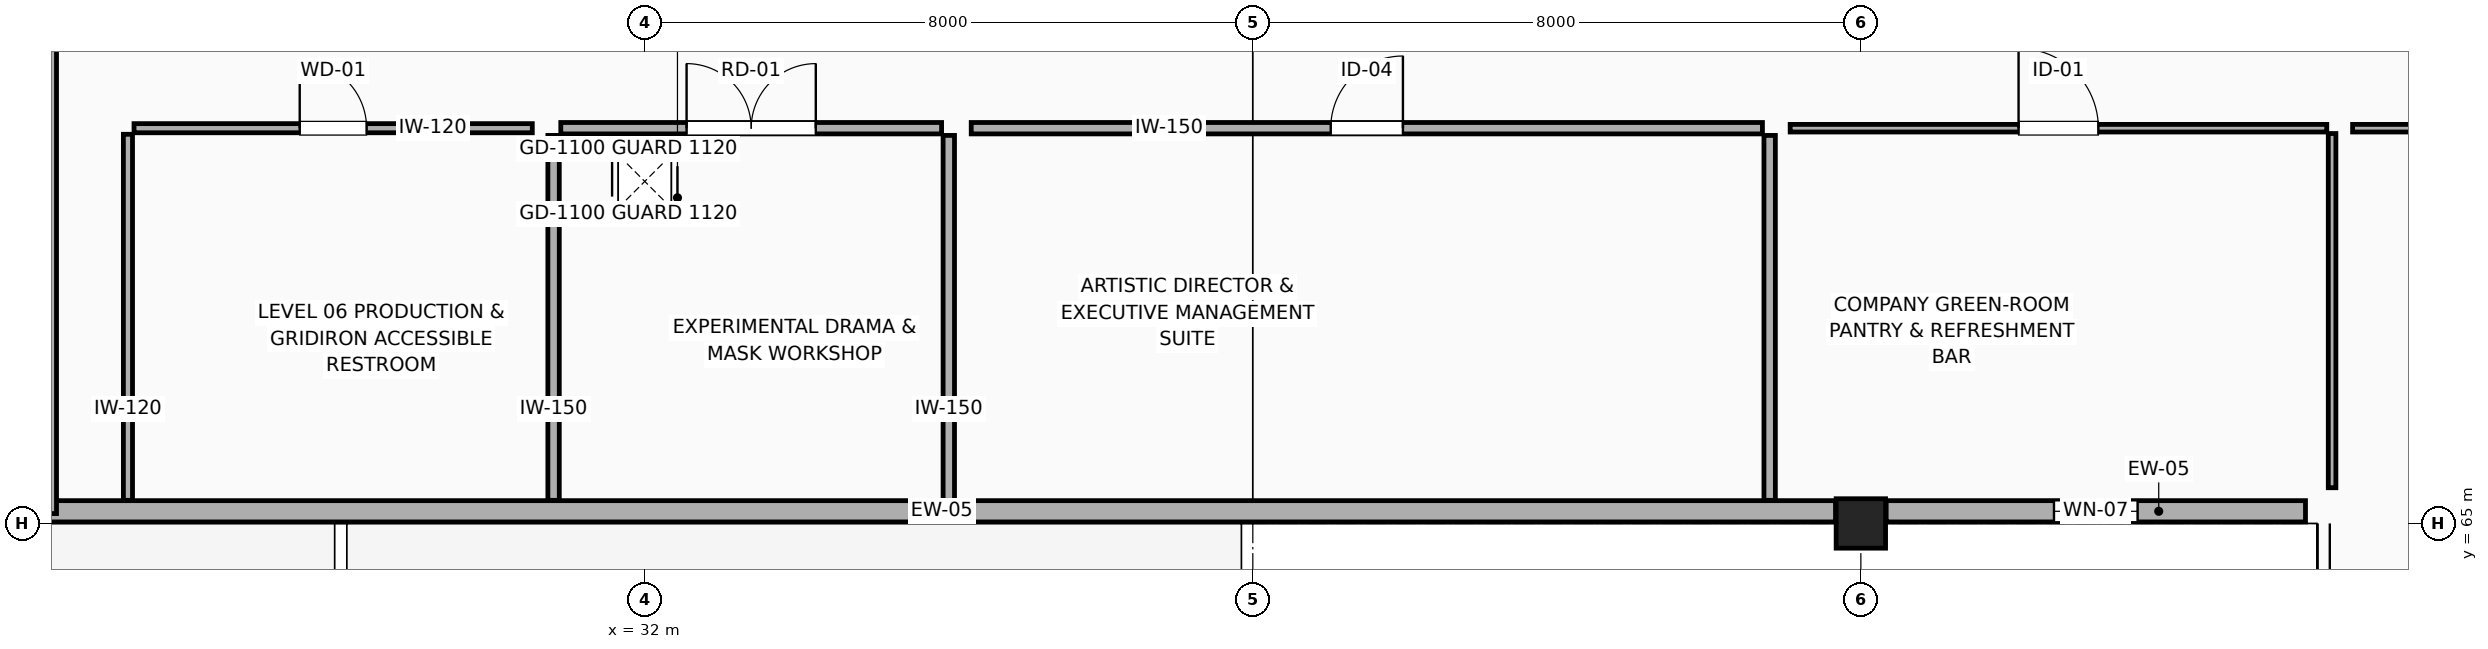
"""IFC4 building model, lengths in metres.
Left out: names, types, materials, properties, quantities, classifications, styles, units other than length and angle.
Written with IfcOpenShell. Run it as: python <this file> out.ifc"""

import sys

from ifc_helpers import new_model, si_unit, direction, frame, frame_2d, origin, origin_2d, place, context, subcontext, project, spatial, rectangle, extrude, element, fill, save


model = new_model("IFC4")
c1 = context("Model", 3, precision=1e-05, world=origin(), true_north=direction((0.0, 1.0)))
c2 = subcontext(c1, "Body", "Model", "MODEL_VIEW")
j1 = project(units=[si_unit("LENGTHUNIT", "METRE"), si_unit("PLANEANGLEUNIT", "RADIAN")], contexts=[c1])
p1 = place(None, origin())
s1 = spatial("IfcSite", under=j1, at=p1, CompositionType="ELEMENT")
p2 = place(p1, origin())
s2 = spatial("IfcBuilding", under=s1, at=p2, CompositionType="ELEMENT")
p3 = place(p2, frame((0.0, 0.0, 24.3)))
s3 = spatial("IfcBuildingStorey", under=s2, at=p3, CompositionType="ELEMENT", Elevation=24.3)
p4 = place(p3, frame((48.0, 65.0, 0.0), z_axis=(0.0, 0.0, 1.0), x_axis=(1.0, 0.0, 0.0)))
e1 = element("IfcColumn", 1, at=p4, inside=s3, PredefinedType="COLUMN", context=c2, shape_type="SweptSolid", body=[
    extrude(rectangle(XDim=0.65, YDim=0.65, at=origin_2d()), origin(), (0.0, 0.0, 1.0), 4.46),
])
p5 = place(p3, frame((53.85, 65.16, 0.0), z_axis=(0.0, 0.0, 1.0), x_axis=(-1.0, 0.0, 0.0)))
e2 = element("IfcWall", 2, at=p5, inside=s3, PredefinedType="STANDARD", context=c2, shape_type="SweptSolid", body=[
    extrude(rectangle(XDim=5.517, YDim=0.28, at=frame_2d((2.759, 0.0))), origin(), (0.0, 0.0, 1.0), 3.965),
])
p6 = place(p5, frame((2.209, 0.0, 0.95)))
e3 = element("IfcOpeningElement", 3, at=p6, cuts=e2, PredefinedType="OPENING", context=c2, shape_type="SweptSolid", body=[
    extrude(rectangle(XDim=1.1, YDim=1.8, at=frame_2d((0.55, 0.9))), frame((0.0, 0.15, 0.0), z_axis=(0.0, -1.0, 0.0), x_axis=(1.0, 0.0, 0.0)), (0.0, 0.0, 1.0), 0.3),
])
p7 = place(p3, frame((47.667, 65.16, 0.0), z_axis=(0.0, 0.0, 1.0), x_axis=(-1.0, 0.0, 0.0)))
e4 = element("IfcWall", 4, at=p7, inside=s3, PredefinedType="STANDARD", context=c2, shape_type="SweptSolid", body=[
    extrude(rectangle(XDim=23.517, YDim=0.28, at=frame_2d((11.759, 0.0))), origin(), (0.0, 0.0, 1.0), 4.28),
])
p8 = place(p3, frame((24.14, 65.13, 0.0), z_axis=(0.0, 0.0, 1.0), x_axis=(0.0, 1.0, 0.0)))
e5 = element("IfcWall", 5, at=p8, inside=s3, PredefinedType="ELEMENTEDWALL", context=c2, shape_type="SweptSolid", body=[
    extrude(rectangle(XDim=17.537, YDim=0.24, at=frame_2d((8.769, 0.0))), origin(), (0.0, 0.0, 1.0), 4.28),
])
p9 = place(p3, frame((54.47, 70.2, 0.0), z_axis=(0.0, 0.0, 1.0), x_axis=(1.0, 0.0, 0.0)))
e6 = element("IfcWall", 6, at=p9, inside=s3, PredefinedType="PARTITIONING", context=c2, shape_type="SweptSolid", body=[
    extrude(rectangle(XDim=9.46, YDim=0.1, at=frame_2d((4.73, 0.0))), origin(), (0.0, 0.0, 1.0), 4.27),
])
p10 = place(p9, frame((4.205, 0.0, 0.0)))
e7 = element("IfcOpeningElement", 7, at=p10, cuts=e6, PredefinedType="OPENING", context=c2, shape_type="SweptSolid", body=[
    extrude(rectangle(XDim=1.05, YDim=2.15, at=frame_2d((0.525, 1.075))), frame((0.0, 0.06, 0.0), z_axis=(0.0, -1.0, 0.0), x_axis=(1.0, 0.0, 0.0)), (0.0, 0.0, 1.0), 0.12),
])
for number, where, z_axis, x_axis in (
    (8, (36.0, 70.105, 0.0), (0.0, 0.0, 1.0), (0.0, -1.0, 0.0)),
    (9, (30.8, 65.304, 0.0), (0.0, 0.0, 1.0), (0.0, 1.0, 0.0)),
):
    element("IfcWall", number, at=place(p3, frame(where, z_axis=z_axis, x_axis=x_axis)), inside=s3, PredefinedType="PARTITIONING", context=c2, shape_type="SweptSolid", body=[
        extrude(rectangle(XDim=4.801, YDim=0.15, at=frame_2d((2.4, 0.0))), origin(), (0.0, 0.0, 1.0), 4.27),
    ])
p11 = place(p3, frame((30.895, 70.2, 0.0), z_axis=(0.0, 0.0, 1.0), x_axis=(1.0, 0.0, 0.0)))
e10 = element("IfcWall", 10, at=p11, inside=s3, PredefinedType="PARTITIONING", context=c2, shape_type="SweptSolid", body=[
    extrude(rectangle(XDim=5.01, YDim=0.15, at=frame_2d((2.505, 0.0))), origin(), (0.0, 0.0, 1.0), 4.27),
])
p12 = place(p11, frame((1.655, 0.0, 0.0)))
e11 = element("IfcOpeningElement", 11, at=p12, cuts=e10, PredefinedType="OPENING", context=c2, shape_type="SweptSolid", body=[
    extrude(rectangle(XDim=1.7, YDim=2.25, at=frame_2d((0.85, 1.125))), frame((0.0, 0.085, 0.0), z_axis=(0.0, -1.0, 0.0), x_axis=(1.0, 0.0, 0.0)), (0.0, 0.0, 1.0), 0.17),
])
p13 = place(p3, frame((36.295, 70.2, 0.0), z_axis=(0.0, 0.0, 1.0), x_axis=(1.0, 0.0, 0.0)))
e12 = element("IfcWall", 12, at=p13, inside=s3, PredefinedType="PARTITIONING", context=c2, shape_type="SweptSolid", body=[
    extrude(rectangle(XDim=10.41, YDim=0.15, at=frame_2d((5.205, 0.0))), origin(), (0.0, 0.0, 1.0), 4.27),
])
p14 = place(p13, frame((4.73, 0.0, 0.0)))
e13 = element("IfcOpeningElement", 13, at=p14, cuts=e12, PredefinedType="OPENING", context=c2, shape_type="SweptSolid", body=[
    extrude(rectangle(XDim=0.95, YDim=2.15, at=frame_2d((0.475, 1.075))), frame((0.0, 0.085, 0.0), z_axis=(0.0, -1.0, 0.0), x_axis=(1.0, 0.0, 0.0)), (0.0, 0.0, 1.0), 0.17),
])
p15 = place(p3, frame((46.8, 70.105, 0.0), z_axis=(0.0, 0.0, 1.0), x_axis=(0.0, -1.0, 0.0)))
e14 = element("IfcWall", 14, at=p15, inside=s3, PredefinedType="PARTITIONING", context=c2, shape_type="SweptSolid", body=[
    extrude(rectangle(XDim=4.801, YDim=0.15, at=frame_2d((2.4, 0.0))), origin(), (0.0, 0.0, 1.0), 4.27),
])
p16 = place(p3, frame((47.07, 70.2, 0.0), z_axis=(0.0, 0.0, 1.0), x_axis=(1.0, 0.0, 0.0)))
e15 = element("IfcWall", 15, at=p16, inside=s3, PredefinedType="PARTITIONING", context=c2, shape_type="SweptSolid", body=[
    extrude(rectangle(XDim=7.06, YDim=0.1, at=frame_2d((3.53, 0.0))), origin(), (0.0, 0.0, 1.0), 4.27),
])
p17 = place(p16, frame((3.005, 0.0, 0.0)))
e16 = element("IfcOpeningElement", 16, at=p17, cuts=e15, PredefinedType="OPENING", context=c2, shape_type="SweptSolid", body=[
    extrude(rectangle(XDim=1.05, YDim=2.15, at=frame_2d((0.525, 1.075))), frame((0.0, 0.06, 0.0), z_axis=(0.0, -1.0, 0.0), x_axis=(1.0, 0.0, 0.0)), (0.0, 0.0, 1.0), 0.12),
])
p18 = place(p3, frame((54.2, 70.13, 0.0), z_axis=(0.0, 0.0, 1.0), x_axis=(0.0, -1.0, 0.0)))
e17 = element("IfcWall", 17, at=p18, inside=s3, PredefinedType="PARTITIONING", context=c2, shape_type="SweptSolid", body=[
    extrude(rectangle(XDim=4.66, YDim=0.1, at=frame_2d((2.33, 0.0))), origin(), (0.0, 0.0, 1.0), 4.27),
])
p19 = place(p3, frame((25.2, 65.304, 0.0), z_axis=(0.0, 0.0, 1.0), x_axis=(0.0, 1.0, 0.0)))
e18 = element("IfcWall", 18, at=p19, inside=s3, PredefinedType="PARTITIONING", context=c2, shape_type="SweptSolid", body=[
    extrude(rectangle(XDim=4.816, YDim=0.12, at=frame_2d((2.408, 0.0))), origin(), (0.0, 0.0, 1.0), 4.27),
])
p20 = place(p3, frame((25.28, 70.2, 0.0), z_axis=(0.0, 0.0, 1.0), x_axis=(1.0, 0.0, 0.0)))
e19 = element("IfcWall", 19, at=p20, inside=s3, PredefinedType="PARTITIONING", context=c2, shape_type="SweptSolid", body=[
    extrude(rectangle(XDim=5.24, YDim=0.12, at=frame_2d((2.62, 0.0))), origin(), (0.0, 0.0, 1.0), 4.27),
])
p21 = place(p20, frame((2.18, 0.0, 0.0)))
e20 = element("IfcOpeningElement", 20, at=p21, cuts=e19, PredefinedType="OPENING", context=c2, shape_type="SweptSolid", body=[
    extrude(rectangle(XDim=0.88, YDim=2.1, at=frame_2d((0.44, 1.05))), frame((0.0, 0.07, 0.0), z_axis=(0.0, -1.0, 0.0), x_axis=(1.0, 0.0, 0.0)), (0.0, 0.0, 1.0), 0.14),
])
p22 = place(p6, origin())
e21 = element("IfcWindow", 21, at=p22, inside=s3, PartitioningType="SINGLE_PANEL", PredefinedType="WINDOW", context=c2, shape_type="SweptSolid", body=[
    extrude(rectangle(XDim=1.1, YDim=1.8, at=frame_2d((0.55, 0.9))), frame((0.0, 0.03, 0.0), z_axis=(0.0, -1.0, 0.0), x_axis=(1.0, 0.0, 0.0)), (0.0, 0.0, 1.0), 0.06),
])
fill(e3, e21)
p23 = place(p12, origin())
e22 = element("IfcDoor", 22, at=p23, inside=s3, OperationType="DOUBLE_DOOR_SINGLE_SWING", PredefinedType="DOOR", context=c2, shape_type="SweptSolid", body=[
    extrude(rectangle(XDim=1.7, YDim=2.25, at=frame_2d((0.85, 1.125))), frame((0.0, 0.025, 0.0), z_axis=(0.0, -1.0, 0.0), x_axis=(1.0, 0.0, 0.0)), (0.0, 0.0, 1.0), 0.05),
])
fill(e11, e22)
p24 = place(p14, origin())
e23 = element("IfcDoor", 23, at=p24, inside=s3, OperationType="SINGLE_SWING_RIGHT", PredefinedType="DOOR", context=c2, shape_type="SweptSolid", body=[
    extrude(rectangle(XDim=0.95, YDim=2.15, at=frame_2d((0.475, 1.075))), frame((0.0, 0.025, 0.0), z_axis=(0.0, -1.0, 0.0), x_axis=(1.0, 0.0, 0.0)), (0.0, 0.0, 1.0), 0.05),
])
fill(e13, e23)
p25 = place(p17, origin())
e24 = element("IfcDoor", 24, at=p25, inside=s3, OperationType="SINGLE_SWING_LEFT", PredefinedType="DOOR", context=c2, shape_type="SweptSolid", body=[
    extrude(rectangle(XDim=1.05, YDim=2.15, at=frame_2d((0.525, 1.075))), frame((0.0, 0.025, 0.0), z_axis=(0.0, -1.0, 0.0), x_axis=(1.0, 0.0, 0.0)), (0.0, 0.0, 1.0), 0.05),
])
fill(e16, e24)
p26 = place(p21, origin())
e25 = element("IfcDoor", 25, at=p26, inside=s3, OperationType="SINGLE_SWING_LEFT", PredefinedType="DOOR", context=c2, shape_type="SweptSolid", body=[
    extrude(rectangle(XDim=0.88, YDim=2.1, at=frame_2d((0.44, 1.05))), frame((0.0, 0.025, 0.0), z_axis=(0.0, -1.0, 0.0), x_axis=(1.0, 0.0, 0.0)), (0.0, 0.0, 1.0), 0.05),
])
fill(e20, e25)
save(model, sys.argv[1])
